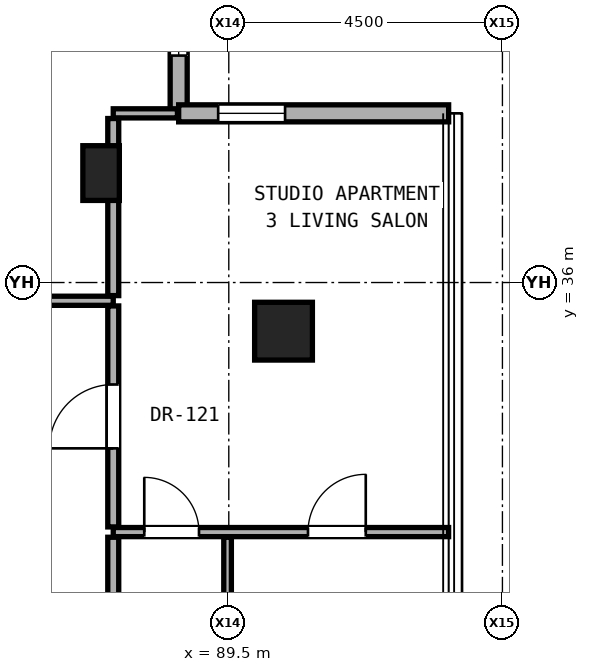
"""IFC4 building model, lengths in metres.
Left out: names, types, materials, properties, quantities, classifications, styles, units other than length and angle.
Written with IfcOpenShell. Run it as: python <this file> out.ifc"""

import sys

from ifc_helpers import new_model, si_unit, direction, frame, frame_2d, origin, origin_2d, place, context, subcontext, project, spatial, rectangle, hollow_rectangle, extrude, element, fill, save


model = new_model("IFC4")
c1 = context("Model", 3, precision=1e-05, world=origin(), true_north=direction((0.0, 1.0)))
c2 = subcontext(c1, "Body", "Model", "MODEL_VIEW")
j1 = project(units=[si_unit("LENGTHUNIT", "METRE"), si_unit("PLANEANGLEUNIT", "RADIAN")], contexts=[c1])
p1 = place(None, origin())
s1 = spatial("IfcSite", under=j1, at=p1, CompositionType="ELEMENT")
p2 = place(p1, origin())
s2 = spatial("IfcBuilding", under=s1, at=p2, CompositionType="ELEMENT")
p3 = place(p2, frame((0.0, 0.0, 186.9)))
s3 = spatial("IfcBuildingStorey", under=s2, at=p3, CompositionType="ELEMENT", Elevation=186.9)
p4 = place(p3, frame((90.4, 35.2, 0.0), z_axis=(0.0, 0.0, 1.0), x_axis=(1.0, 0.0, 0.0)))
e1 = element("IfcColumn", 1, at=p4, inside=s3, PredefinedType="COLUMN", context=c2, shape_type="SweptSolid", body=[
    extrude(hollow_rectangle(XDim=0.95, YDim=0.95, WallThickness=0.05, at=origin_2d()), origin(), (0.0, 0.0, 1.0), 3.25),
])
p5 = place(p3, frame((87.4, 37.8, 0.0), z_axis=(0.0, 0.0, 1.0), x_axis=(1.0, 0.0, 0.0)))
e2 = element("IfcColumn", 2, at=p5, inside=s3, PredefinedType="PILASTER", context=c2, shape_type="SweptSolid", body=[
    extrude(rectangle(XDim=0.6, YDim=0.9, at=origin_2d()), origin(), (0.0, 0.0, 1.0), 3.25),
])
p6 = place(p3, frame((88.676, 38.782, 0.0), z_axis=(0.0, 0.0, 1.0), x_axis=(0.0, 1.0, 0.0)))
e3 = element("IfcWall", 3, at=p6, inside=s3, PredefinedType="SOLIDWALL", context=c2, shape_type="SweptSolid", body=[
    extrude(rectangle(XDim=4.44, YDim=0.28, at=frame_2d((2.22, 0.0))), origin(), (0.0, 0.0, 1.0), 3.03),
])
p7 = place(p6, frame((0.95, 0.0, 0.85)))
e4 = element("IfcOpeningElement", 4, at=p7, cuts=e3, PredefinedType="OPENING", context=c2, shape_type="SweptSolid", body=[
    extrude(rectangle(XDim=1.1, YDim=2.0, at=frame_2d((0.55, 1.0))), frame((0.0, 0.15, 0.0), z_axis=(0.0, -1.0, 0.0), x_axis=(1.0, 0.0, 0.0)), (0.0, 0.0, 1.0), 0.3),
])
p8 = place(p3, frame((93.115, 38.782, 0.0), z_axis=(0.0, 0.0, 1.0), x_axis=(-1.0, 0.0, 0.0)))
e5 = element("IfcWall", 5, at=p8, inside=s3, PredefinedType="SOLIDWALL", context=c2, shape_type="SweptSolid", body=[
    extrude(rectangle(XDim=4.44, YDim=0.28, at=frame_2d((2.22, 0.0))), origin(), (0.0, 0.0, 1.0), 3.03),
])
p9 = place(p8, frame((2.69, 0.0, 0.85)))
e6 = element("IfcOpeningElement", 6, at=p9, cuts=e5, PredefinedType="OPENING", context=c2, shape_type="SweptSolid", body=[
    extrude(rectangle(XDim=1.1, YDim=2.0, at=frame_2d((0.55, 1.0))), frame((0.0, 0.15, 0.0), z_axis=(0.0, -1.0, 0.0), x_axis=(1.0, 0.0, 0.0)), (0.0, 0.0, 1.0), 0.3),
])
p10 = place(p3, frame((87.6, 31.896, 0.0), z_axis=(0.0, 0.0, 1.0), x_axis=(1.0, 0.0, 0.0)))
e7 = element("IfcWall", 7, at=p10, inside=s3, PredefinedType="PARTITIONING", context=c2, shape_type="SweptSolid", body=[
    extrude(rectangle(XDim=5.515, YDim=0.15, at=frame_2d((2.757, 0.0))), origin(), (0.0, 0.0, 1.0), 2.269),
])
p11 = place(p10, frame((3.202, 0.0, 0.0)))
e8 = element("IfcOpeningElement", 8, at=p11, cuts=e7, PredefinedType="OPENING", context=c2, shape_type="SweptSolid", body=[
    extrude(rectangle(XDim=0.95, YDim=2.15, at=frame_2d((0.475, 1.075))), frame((0.0, 0.085, 0.0), z_axis=(0.0, -1.0, 0.0), x_axis=(1.0, 0.0, 0.0)), (0.0, 0.0, 1.0), 0.17),
])
p12 = place(p10, frame((0.51, 0.0, 0.0)))
e9 = element("IfcOpeningElement", 9, at=p12, cuts=e7, PredefinedType="OPENING", context=c2, shape_type="SweptSolid", body=[
    extrude(rectangle(XDim=0.9, YDim=2.1, at=frame_2d((0.45, 1.05))), frame((0.0, 0.085, 0.0), z_axis=(0.0, -1.0, 0.0), x_axis=(1.0, 0.0, 0.0)), (0.0, 0.0, 1.0), 0.17),
])
p13 = place(p3, frame((86.25, 35.7, 0.0), z_axis=(0.0, 0.0, 1.0), x_axis=(1.0, 0.0, 0.0)))
e10 = element("IfcWall", 10, at=p13, inside=s3, PredefinedType="PARTITIONING", context=c2, shape_type="SweptSolid", body=[
    extrude(rectangle(XDim=1.35, YDim=0.15, at=frame_2d((0.675, 0.0))), origin(), (0.0, 0.0, 1.0), 3.05),
])
p14 = place(p3, frame((87.6, 38.782, 0.0), z_axis=(0.0, 0.0, 1.0), x_axis=(1.0, 0.0, 0.0)))
e11 = element("IfcWall", 11, at=p14, inside=s3, PredefinedType="PARTITIONING", context=c2, shape_type="SweptSolid", body=[
    extrude(rectangle(XDim=1.056, YDim=0.15, at=frame_2d((0.528, 0.0))), origin(), (0.0, 0.0, 1.0), 3.05),
])
p15 = place(p3, frame((87.6, 29.681, 0.0), z_axis=(0.0, 0.0, 1.0), x_axis=(0.0, 1.0, 0.0)))
e12 = element("IfcWall", 12, at=p15, inside=s3, PredefinedType="PARTITIONING", context=c2, shape_type="SweptSolid", body=[
    extrude(rectangle(XDim=2.13, YDim=0.18, at=frame_2d((1.065, 0.0))), origin(), (0.0, 0.0, 1.0), 3.05),
])
p16 = place(p3, frame((87.6, 31.981, 0.0), z_axis=(0.0, 0.0, 1.0), x_axis=(0.0, 1.0, 0.0)))
e13 = element("IfcWall", 13, at=p16, inside=s3, PredefinedType="PARTITIONING", context=c2, shape_type="SweptSolid", body=[
    extrude(rectangle(XDim=3.634, YDim=0.18, at=frame_2d((1.817, 0.0))), origin(), (0.0, 0.0, 1.0), 2.442),
])
p17 = place(p16, frame((1.292, 0.0, 0.0)))
e14 = element("IfcOpeningElement", 14, at=p17, cuts=e13, PredefinedType="OPENING", context=c2, shape_type="SweptSolid", body=[
    extrude(rectangle(XDim=1.05, YDim=2.2, at=frame_2d((0.525, 1.1))), frame((0.0, 0.1, 0.0), z_axis=(0.0, -1.0, 0.0), x_axis=(1.0, 0.0, 0.0)), (0.0, 0.0, 1.0), 0.2),
])
p18 = place(p3, frame((87.6, 35.785, 0.0), z_axis=(0.0, 0.0, 1.0), x_axis=(0.0, 1.0, 0.0)))
e15 = element("IfcWall", 15, at=p18, inside=s3, PredefinedType="PARTITIONING", context=c2, shape_type="SweptSolid", body=[
    extrude(rectangle(XDim=2.912, YDim=0.18, at=frame_2d((1.456, 0.0))), origin(), (0.0, 0.0, 1.0), 2.493),
])
p19 = place(p3, frame((89.48, 29.681, 0.0), z_axis=(0.0, 0.0, 1.0), x_axis=(0.0, 1.0, 0.0)))
e16 = element("IfcWall", 16, at=p19, inside=s3, PredefinedType="PARTITIONING", context=c2, shape_type="SweptSolid", body=[
    extrude(rectangle(XDim=2.13, YDim=0.125, at=frame_2d((1.065, 0.0))), origin(), (0.0, 0.0, 1.0), 3.05),
])
p20 = place(p7, origin())
e17 = element("IfcWindow", 17, at=p20, inside=s3, PartitioningType="SINGLE_PANEL", PredefinedType="WINDOW", context=c2, shape_type="SweptSolid", body=[
    extrude(rectangle(XDim=1.1, YDim=2.0, at=frame_2d((0.55, 1.0))), frame((0.0, 0.03, 0.0), z_axis=(0.0, -1.0, 0.0), x_axis=(1.0, 0.0, 0.0)), (0.0, 0.0, 1.0), 0.06),
])
fill(e4, e17)
p21 = place(p9, origin())
e18 = element("IfcWindow", 18, at=p21, inside=s3, PartitioningType="SINGLE_PANEL", PredefinedType="WINDOW", context=c2, shape_type="SweptSolid", body=[
    extrude(rectangle(XDim=1.1, YDim=2.0, at=frame_2d((0.55, 1.0))), frame((0.0, 0.03, 0.0), z_axis=(0.0, -1.0, 0.0), x_axis=(1.0, 0.0, 0.0)), (0.0, 0.0, 1.0), 0.06),
])
fill(e6, e18)
p22 = place(p17, origin())
e19 = element("IfcDoor", 19, at=p22, inside=s3, OperationType="SINGLE_SWING_LEFT", PredefinedType="DOOR", context=c2, shape_type="SweptSolid", body=[
    extrude(rectangle(XDim=1.05, YDim=2.2, at=frame_2d((0.525, 1.1))), frame((0.0, 0.025, 0.0), z_axis=(0.0, -1.0, 0.0), x_axis=(1.0, 0.0, 0.0)), (0.0, 0.0, 1.0), 0.05),
])
fill(e14, e19)
p23 = place(p11, origin())
e20 = element("IfcDoor", 20, at=p23, inside=s3, OperationType="SINGLE_SWING_RIGHT", PredefinedType="DOOR", context=c2, shape_type="SweptSolid", body=[
    extrude(rectangle(XDim=0.95, YDim=2.15, at=frame_2d((0.475, 1.075))), frame((0.0, 0.025, 0.0), z_axis=(0.0, -1.0, 0.0), x_axis=(1.0, 0.0, 0.0)), (0.0, 0.0, 1.0), 0.05),
])
fill(e8, e20)
p24 = place(p12, origin())
e21 = element("IfcDoor", 21, at=p24, inside=s3, OperationType="SINGLE_SWING_LEFT", PredefinedType="DOOR", context=c2, shape_type="SweptSolid", body=[
    extrude(rectangle(XDim=0.9, YDim=2.1, at=frame_2d((0.45, 1.05))), frame((0.0, 0.025, 0.0), z_axis=(0.0, -1.0, 0.0), x_axis=(1.0, 0.0, 0.0)), (0.0, 0.0, 1.0), 0.05),
])
fill(e9, e21)
save(model, sys.argv[1])
